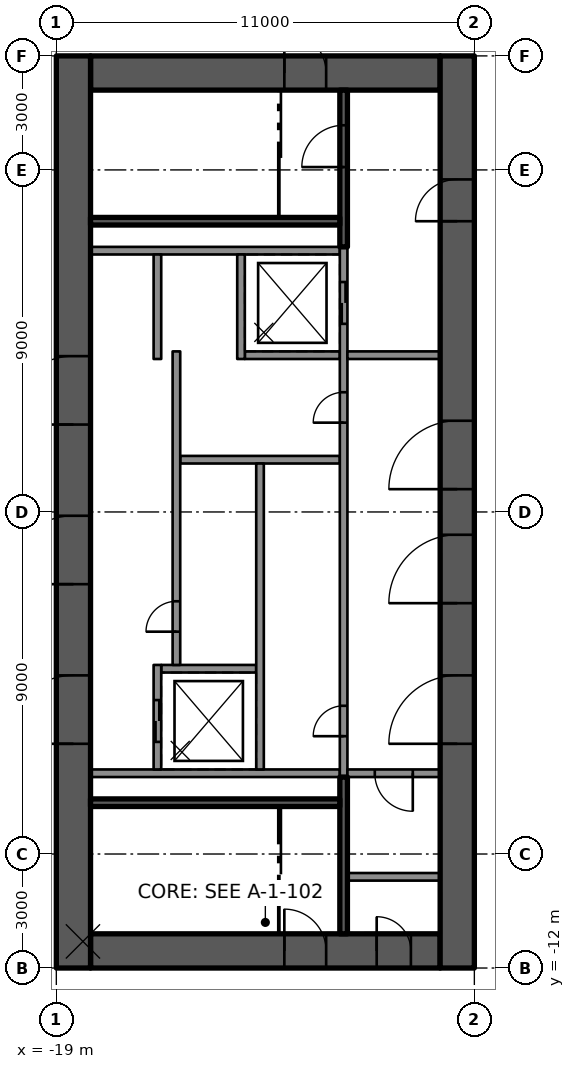
"""IFC4 building model, lengths in metres.
Left out: names, types, materials, properties, quantities, classifications, styles, units other than length and angle.
Written with IfcOpenShell. Run it as: python <this file> out.ifc"""

import sys

from ifc_helpers import new_model, si_unit, direction, frame, frame_2d, origin, place, context, subcontext, project, spatial, rectangle, extrude, element, fill, save


model = new_model("IFC4")
c1 = context("Model", 3, precision=1e-05, world=origin(), true_north=direction((0.0, 1.0)))
c2 = subcontext(c1, "Body", "Model", "MODEL_VIEW")
j1 = project(units=[si_unit("LENGTHUNIT", "METRE"), si_unit("PLANEANGLEUNIT", "RADIAN")], contexts=[c1])
p1 = place(None, origin())
s1 = spatial("IfcSite", under=j1, at=p1, CompositionType="ELEMENT")
p2 = place(p1, origin())
s2 = spatial("IfcBuilding", under=s1, at=p2, CompositionType="ELEMENT")
p3 = place(p2, frame((0.0, 0.0, 299.9)))
s3 = spatial("IfcBuildingStorey", under=s2, at=p3, CompositionType="ELEMENT", Elevation=299.9)
p4 = place(p3, frame((-18.1, 11.55, 0.0), z_axis=(0.0, 0.0, 1.0), x_axis=(1.0, 0.0, 0.0)))
e1 = element("IfcWall", 1, at=p4, inside=s3, PredefinedType="SHEAR", context=c2, shape_type="SweptSolid", body=[
    extrude(rectangle(XDim=9.2, YDim=0.9, at=frame_2d((4.6, 0.0))), origin(), (0.0, 0.0, 1.0), 4.4),
])
p5 = place(p4, frame((5.1, 0.0, 0.0)))
e2 = element("IfcOpeningElement", 2, at=p5, cuts=e1, PredefinedType="OPENING", context=c2, shape_type="SweptSolid", body=[
    extrude(rectangle(XDim=1.1, YDim=2.1, at=frame_2d((0.55, 1.05))), frame((0.0, 0.46, 0.0), z_axis=(0.0, -1.0, 0.0), x_axis=(1.0, 0.0, 0.0)), (0.0, 0.0, 1.0), 0.92),
])
p6 = place(p3, frame((-18.1, -11.55, 0.0), z_axis=(0.0, 0.0, 1.0), x_axis=(1.0, 0.0, 0.0)))
e3 = element("IfcWall", 3, at=p6, inside=s3, PredefinedType="SHEAR", context=c2, shape_type="SweptSolid", body=[
    extrude(rectangle(XDim=9.2, YDim=0.9, at=frame_2d((4.6, 0.0))), origin(), (0.0, 0.0, 1.0), 4.4),
])
p7 = place(p6, frame((5.1, 0.0, 0.0)))
e4 = element("IfcOpeningElement", 4, at=p7, cuts=e3, PredefinedType="OPENING", context=c2, shape_type="SweptSolid", body=[
    extrude(rectangle(XDim=1.1, YDim=2.1, at=frame_2d((0.55, 1.05))), frame((0.0, 0.46, 0.0), z_axis=(0.0, -1.0, 0.0), x_axis=(1.0, 0.0, 0.0)), (0.0, 0.0, 1.0), 0.92),
])
p8 = place(p6, frame((7.53, 0.0, 0.0)))
e5 = element("IfcOpeningElement", 5, at=p8, cuts=e3, PredefinedType="OPENING", context=c2, shape_type="SweptSolid", body=[
    extrude(rectangle(XDim=0.9, YDim=2.1, at=frame_2d((0.45, 1.05))), frame((0.0, 0.46, 0.0), z_axis=(0.0, -1.0, 0.0), x_axis=(1.0, 0.0, 0.0)), (0.0, 0.0, 1.0), 0.92),
])
p9 = place(p3, frame((-18.55, -12.0, 0.0), z_axis=(0.0, 0.0, 1.0), x_axis=(0.0, 1.0, 0.0)))
e6 = element("IfcWall", 6, at=p9, inside=s3, PredefinedType="SHEAR", context=c2, shape_type="SweptSolid", body=[
    extrude(rectangle(XDim=24.0, YDim=0.9, at=frame_2d((12.0, 0.0))), origin(), (0.0, 0.0, 1.0), 4.4),
])
p10 = place(p9, frame((5.9, 0.0, 0.0)))
e7 = element("IfcOpeningElement", 7, at=p10, cuts=e6, PredefinedType="OPENING", context=c2, shape_type="SweptSolid", body=[
    extrude(rectangle(XDim=1.8, YDim=2.1, at=frame_2d((0.9, 1.05))), frame((0.0, 0.46, 0.0), z_axis=(0.0, -1.0, 0.0), x_axis=(1.0, 0.0, 0.0)), (0.0, 0.0, 1.0), 0.92),
])
p11 = place(p9, frame((10.1, 0.0, 0.0)))
e8 = element("IfcOpeningElement", 8, at=p11, cuts=e6, PredefinedType="OPENING", context=c2, shape_type="SweptSolid", body=[
    extrude(rectangle(XDim=1.8, YDim=2.1, at=frame_2d((0.9, 1.05))), frame((0.0, 0.46, 0.0), z_axis=(0.0, -1.0, 0.0), x_axis=(1.0, 0.0, 0.0)), (0.0, 0.0, 1.0), 0.92),
])
p12 = place(p9, frame((14.3, 0.0, 0.0)))
e9 = element("IfcOpeningElement", 9, at=p12, cuts=e6, PredefinedType="OPENING", context=c2, shape_type="SweptSolid", body=[
    extrude(rectangle(XDim=1.8, YDim=2.1, at=frame_2d((0.9, 1.05))), frame((0.0, 0.46, 0.0), z_axis=(0.0, -1.0, 0.0), x_axis=(1.0, 0.0, 0.0)), (0.0, 0.0, 1.0), 0.92),
])
p13 = place(p3, frame((-8.45, -12.0, 0.0), z_axis=(0.0, 0.0, 1.0), x_axis=(0.0, 1.0, 0.0)))
e10 = element("IfcWall", 10, at=p13, inside=s3, PredefinedType="SHEAR", context=c2, shape_type="SweptSolid", body=[
    extrude(rectangle(XDim=24.0, YDim=0.9, at=frame_2d((12.0, 0.0))), origin(), (0.0, 0.0, 1.0), 4.4),
])
p14 = place(p13, frame((9.6, 0.0, 0.0)))
e11 = element("IfcOpeningElement", 11, at=p14, cuts=e10, PredefinedType="OPENING", context=c2, shape_type="SweptSolid", body=[
    extrude(rectangle(XDim=1.8, YDim=2.1, at=frame_2d((0.9, 1.05))), frame((0.0, 0.46, 0.0), z_axis=(0.0, -1.0, 0.0), x_axis=(1.0, 0.0, 0.0)), (0.0, 0.0, 1.0), 0.92),
])
p15 = place(p13, frame((5.9, 0.0, 0.0)))
e12 = element("IfcOpeningElement", 12, at=p15, cuts=e10, PredefinedType="OPENING", context=c2, shape_type="SweptSolid", body=[
    extrude(rectangle(XDim=1.8, YDim=2.1, at=frame_2d((0.9, 1.05))), frame((0.0, 0.46, 0.0), z_axis=(0.0, -1.0, 0.0), x_axis=(1.0, 0.0, 0.0)), (0.0, 0.0, 1.0), 0.92),
])
p16 = place(p13, frame((12.6, 0.0, 0.0)))
e13 = element("IfcOpeningElement", 13, at=p16, cuts=e10, PredefinedType="OPENING", context=c2, shape_type="SweptSolid", body=[
    extrude(rectangle(XDim=1.8, YDim=2.1, at=frame_2d((0.9, 1.05))), frame((0.0, 0.46, 0.0), z_axis=(0.0, -1.0, 0.0), x_axis=(1.0, 0.0, 0.0)), (0.0, 0.0, 1.0), 0.92),
])
p17 = place(p13, frame((19.65, 0.0, 0.0)))
e14 = element("IfcOpeningElement", 14, at=p17, cuts=e10, PredefinedType="OPENING", context=c2, shape_type="SweptSolid", body=[
    extrude(rectangle(XDim=1.1, YDim=2.1, at=frame_2d((0.55, 1.05))), frame((0.0, 0.46, 0.0), z_axis=(0.0, -1.0, 0.0), x_axis=(1.0, 0.0, 0.0)), (0.0, 0.0, 1.0), 0.92),
])
for number, where, z_axis, x_axis in (
    (15, (-11.54, 6.875, 0.0), (0.0, 0.0, 1.0), (-1.0, 0.0, 0.0)),
    (16, (-11.54, -6.875, 0.0), (0.0, 0.0, 1.0), (-1.0, 0.0, 0.0)),
):
    element("IfcWall", number, at=place(p3, frame(where, z_axis=z_axis, x_axis=x_axis)), inside=s3, PredefinedType="SOLIDWALL", context=c2, shape_type="SweptSolid", body=[
        extrude(rectangle(XDim=6.56, YDim=0.2, at=frame_2d((3.28, 0.0))), origin(), (0.0, 0.0, 1.0), 3.98),
    ])
p18 = place(p3, frame((-13.74, -4.125, 0.0), z_axis=(0.0, 0.0, 1.0), x_axis=(-1.0, 0.0, 0.0)))
e17 = element("IfcWall", 17, at=p18, inside=s3, PredefinedType="SOLIDWALL", context=c2, shape_type="SweptSolid", body=[
    extrude(rectangle(XDim=2.5, YDim=0.2, at=frame_2d((1.25, 0.0))), origin(), (0.0, 0.0, 1.0), 3.98),
])
p19 = place(p3, frame((-11.54, 1.375, 0.0), z_axis=(0.0, 0.0, 1.0), x_axis=(-1.0, 0.0, 0.0)))
e18 = element("IfcWall", 18, at=p19, inside=s3, PredefinedType="SOLIDWALL", context=c2, shape_type="SweptSolid", body=[
    extrude(rectangle(XDim=4.2, YDim=0.2, at=frame_2d((2.1, 0.0))), origin(), (0.0, 0.0, 1.0), 3.98),
])
p20 = place(p3, frame((-11.54, 4.125, 0.0), z_axis=(0.0, 0.0, 1.0), x_axis=(-1.0, 0.0, 0.0)))
e19 = element("IfcWall", 19, at=p20, inside=s3, PredefinedType="SOLIDWALL", context=c2, shape_type="SweptSolid", body=[
    extrude(rectangle(XDim=2.5, YDim=0.2, at=frame_2d((1.25, 0.0))), origin(), (0.0, 0.0, 1.0), 3.98),
])
p21 = place(p3, frame((-11.44, -6.975, 0.0), z_axis=(0.0, 0.0, 1.0), x_axis=(0.0, 1.0, 0.0)))
e20 = element("IfcWall", 20, at=p21, inside=s3, PredefinedType="SOLIDWALL", context=c2, shape_type="SweptSolid", body=[
    extrude(rectangle(XDim=13.95, YDim=0.2, at=frame_2d((6.975, 0.0))), origin(), (0.0, 0.0, 1.0), 3.98),
])
p22 = place(p21, frame((11.925, 0.0, 0.0)))
e21 = element("IfcOpeningElement", 21, at=p22, cuts=e20, PredefinedType="OPENING", context=c2, shape_type="SweptSolid", body=[
    extrude(rectangle(XDim=1.1, YDim=2.1, at=frame_2d((0.55, 1.05))), frame((0.0, 0.11, 0.0), z_axis=(0.0, -1.0, 0.0), x_axis=(1.0, 0.0, 0.0)), (0.0, 0.0, 1.0), 0.22),
])
p23 = place(p21, frame((1.075, 0.0, 0.0)))
e22 = element("IfcOpeningElement", 22, at=p23, cuts=e20, PredefinedType="OPENING", context=c2, shape_type="SweptSolid", body=[
    extrude(rectangle(XDim=0.8, YDim=2.1, at=frame_2d((0.4, 1.05))), frame((0.0, 0.11, 0.0), z_axis=(0.0, -1.0, 0.0), x_axis=(1.0, 0.0, 0.0)), (0.0, 0.0, 1.0), 0.22),
])
p24 = place(p21, frame((9.325, 0.0, 0.0)))
e23 = element("IfcOpeningElement", 23, at=p24, cuts=e20, PredefinedType="OPENING", context=c2, shape_type="SweptSolid", body=[
    extrude(rectangle(XDim=0.8, YDim=2.1, at=frame_2d((0.4, 1.05))), frame((0.0, 0.11, 0.0), z_axis=(0.0, -1.0, 0.0), x_axis=(1.0, 0.0, 0.0)), (0.0, 0.0, 1.0), 0.22),
])
p25 = place(p3, frame((-13.64, -6.775, 0.0), z_axis=(0.0, 0.0, 1.0), x_axis=(0.0, 1.0, 0.0)))
e24 = element("IfcWall", 24, at=p25, inside=s3, PredefinedType="SOLIDWALL", context=c2, shape_type="SweptSolid", body=[
    extrude(rectangle(XDim=8.05, YDim=0.2, at=frame_2d((4.025, 0.0))), origin(), (0.0, 0.0, 1.0), 3.98),
])
p26 = place(p3, frame((-14.14, 4.025, 0.0), z_axis=(0.0, 0.0, 1.0), x_axis=(0.0, 1.0, 0.0)))
e25 = element("IfcWall", 25, at=p26, inside=s3, PredefinedType="SOLIDWALL", context=c2, shape_type="SweptSolid", body=[
    extrude(rectangle(XDim=2.75, YDim=0.2, at=frame_2d((1.375, 0.0))), origin(), (0.0, 0.0, 1.0), 3.98),
])
p27 = place(p3, frame((-16.34, -6.775, 0.0), z_axis=(0.0, 0.0, 1.0), x_axis=(0.0, 1.0, 0.0)))
e26 = element("IfcWall", 26, at=p27, inside=s3, PredefinedType="SOLIDWALL", context=c2, shape_type="SweptSolid", body=[
    extrude(rectangle(XDim=2.75, YDim=0.2, at=frame_2d((1.375, 0.0))), origin(), (0.0, 0.0, 1.0), 3.98),
])
p28 = place(p27, frame((0.725, 0.0, 0.0)))
e27 = element("IfcOpeningElement", 27, at=p28, cuts=e26, PredefinedType="OPENING", context=c2, shape_type="SweptSolid", body=[
    extrude(rectangle(XDim=1.1, YDim=2.1, at=frame_2d((0.55, 1.05))), frame((0.0, 0.11, 0.0), z_axis=(0.0, -1.0, 0.0), x_axis=(1.0, 0.0, 0.0)), (0.0, 0.0, 1.0), 0.22),
])
p29 = place(p3, frame((-15.84, -4.025, 0.0), z_axis=(0.0, 0.0, 1.0), x_axis=(0.0, 1.0, 0.0)))
e28 = element("IfcWall", 28, at=p29, inside=s3, PredefinedType="SOLIDWALL", context=c2, shape_type="SweptSolid", body=[
    extrude(rectangle(XDim=8.25, YDim=0.2, at=frame_2d((4.125, 0.0))), origin(), (0.0, 0.0, 1.0), 3.98),
])
p30 = place(p29, frame((0.875, 0.0, 0.0)))
e29 = element("IfcOpeningElement", 29, at=p30, cuts=e28, PredefinedType="OPENING", context=c2, shape_type="SweptSolid", body=[
    extrude(rectangle(XDim=0.8, YDim=2.1, at=frame_2d((0.4, 1.05))), frame((0.0, 0.11, 0.0), z_axis=(0.0, -1.0, 0.0), x_axis=(1.0, 0.0, 0.0)), (0.0, 0.0, 1.0), 0.22),
])
p31 = place(p3, frame((-16.34, 4.025, 0.0), z_axis=(0.0, 0.0, 1.0), x_axis=(0.0, 1.0, 0.0)))
e30 = element("IfcWall", 30, at=p31, inside=s3, PredefinedType="SOLIDWALL", context=c2, shape_type="SweptSolid", body=[
    extrude(rectangle(XDim=2.75, YDim=0.2, at=frame_2d((1.375, 0.0))), origin(), (0.0, 0.0, 1.0), 3.98),
])
p32 = place(p3, frame((-11.44, 6.975, 0.0), z_axis=(0.0, 0.0, 1.0), x_axis=(0.0, 1.0, 0.0)))
e31 = element("IfcWall", 31, at=p32, inside=s3, PredefinedType="SOLIDWALL", context=c2, shape_type="SweptSolid", body=[
    extrude(rectangle(XDim=4.125, YDim=0.2, at=frame_2d((2.062, 0.0))), origin(), (0.0, 0.0, 1.0), 3.98),
])
p33 = place(p32, frame((2.1, 0.0, 0.0)))
e32 = element("IfcOpeningElement", 32, at=p33, cuts=e31, PredefinedType="OPENING", context=c2, shape_type="SweptSolid", body=[
    extrude(rectangle(XDim=1.1, YDim=2.1, at=frame_2d((0.55, 1.05))), frame((0.0, 0.11, 0.0), z_axis=(0.0, -1.0, 0.0), x_axis=(1.0, 0.0, 0.0)), (0.0, 0.0, 1.0), 0.22),
])
p34 = place(p3, frame((-11.54, 7.65, 0.0), z_axis=(0.0, 0.0, 1.0), x_axis=(-1.0, 0.0, 0.0)))
e33 = element("IfcWall", 33, at=p34, inside=s3, PredefinedType="SOLIDWALL", context=c2, shape_type="SweptSolid", body=[
    extrude(rectangle(XDim=6.56, YDim=0.2, at=frame_2d((3.28, 0.0))), origin(), (0.0, 0.0, 1.0), 3.98),
])
p35 = place(p3, frame((-11.44, -11.1, 0.0), z_axis=(0.0, 0.0, 1.0), x_axis=(0.0, 1.0, 0.0)))
e34 = element("IfcWall", 34, at=p35, inside=s3, PredefinedType="SOLIDWALL", context=c2, shape_type="SweptSolid", body=[
    extrude(rectangle(XDim=4.125, YDim=0.2, at=frame_2d((2.062, 0.0))), origin(), (0.0, 0.0, 1.0), 3.98),
])
p36 = place(p3, frame((-11.54, -7.65, 0.0), z_axis=(0.0, 0.0, 1.0), x_axis=(-1.0, 0.0, 0.0)))
e35 = element("IfcWall", 35, at=p36, inside=s3, PredefinedType="SOLIDWALL", context=c2, shape_type="SweptSolid", body=[
    extrude(rectangle(XDim=6.56, YDim=0.2, at=frame_2d((3.28, 0.0))), origin(), (0.0, 0.0, 1.0), 3.98),
])
p37 = place(p3, frame((-8.9, 4.125, 0.0), z_axis=(0.0, 0.0, 1.0), x_axis=(-1.0, 0.0, 0.0)))
e36 = element("IfcWall", 36, at=p37, inside=s3, PredefinedType="PARTITIONING", context=c2, shape_type="SweptSolid", body=[
    extrude(rectangle(XDim=2.44, YDim=0.2, at=frame_2d((1.22, 0.0))), origin(), (0.0, 0.0, 1.0), 3.98),
])
p38 = place(p3, frame((-8.9, -6.875, 0.0), z_axis=(0.0, 0.0, 1.0), x_axis=(-1.0, 0.0, 0.0)))
e37 = element("IfcWall", 37, at=p38, inside=s3, PredefinedType="PARTITIONING", context=c2, shape_type="SweptSolid", body=[
    extrude(rectangle(XDim=2.44, YDim=0.2, at=frame_2d((1.22, 0.0))), origin(), (0.0, 0.0, 1.0), 3.98),
])
p39 = place(p38, frame((0.72, 0.0, 0.0)))
e38 = element("IfcOpeningElement", 38, at=p39, cuts=e37, PredefinedType="OPENING", context=c2, shape_type="SweptSolid", body=[
    extrude(rectangle(XDim=1.0, YDim=2.1, at=frame_2d((0.5, 1.05))), frame((0.0, 0.11, 0.0), z_axis=(0.0, -1.0, 0.0), x_axis=(1.0, 0.0, 0.0)), (0.0, 0.0, 1.0), 0.22),
])
p40 = place(p3, frame((-8.9, -9.6, 0.0), z_axis=(0.0, 0.0, 1.0), x_axis=(-1.0, 0.0, 0.0)))
e39 = element("IfcWall", 39, at=p40, inside=s3, PredefinedType="PARTITIONING", context=c2, shape_type="SweptSolid", body=[
    extrude(rectangle(XDim=2.44, YDim=0.2, at=frame_2d((1.22, 0.0))), origin(), (0.0, 0.0, 1.0), 3.98),
])
p41 = place(p28, origin())
e40 = element("IfcDoor", 40, at=p41, inside=s3, OperationType="DOUBLE_DOOR_SLIDING", PredefinedType="DOOR", context=c2, shape_type="SweptSolid", body=[
    extrude(rectangle(XDim=1.1, YDim=2.1, at=frame_2d((0.55, 1.05))), frame((0.0, 0.025, 0.0), z_axis=(0.0, -1.0, 0.0), x_axis=(1.0, 0.0, 0.0)), (0.0, 0.0, 1.0), 0.05),
])
fill(e27, e40)
p42 = place(p22, origin())
e41 = element("IfcDoor", 41, at=p42, inside=s3, OperationType="DOUBLE_DOOR_SLIDING", PredefinedType="DOOR", context=c2, shape_type="SweptSolid", body=[
    extrude(rectangle(XDim=1.1, YDim=2.1, at=frame_2d((0.55, 1.05))), frame((0.0, 0.025, 0.0), z_axis=(0.0, -1.0, 0.0), x_axis=(1.0, 0.0, 0.0)), (0.0, 0.0, 1.0), 0.05),
])
fill(e21, e41)
p43 = place(p23, origin())
e42 = element("IfcDoor", 42, at=p43, inside=s3, OperationType="SINGLE_SWING_LEFT", PredefinedType="DOOR", context=c2, shape_type="SweptSolid", body=[
    extrude(rectangle(XDim=0.8, YDim=2.1, at=frame_2d((0.4, 1.05))), frame((0.0, 0.025, 0.0), z_axis=(0.0, -1.0, 0.0), x_axis=(1.0, 0.0, 0.0)), (0.0, 0.0, 1.0), 0.05),
])
fill(e22, e42)
p44 = place(p30, origin())
e43 = element("IfcDoor", 43, at=p44, inside=s3, OperationType="SINGLE_SWING_LEFT", PredefinedType="DOOR", context=c2, shape_type="SweptSolid", body=[
    extrude(rectangle(XDim=0.8, YDim=2.1, at=frame_2d((0.4, 1.05))), frame((0.0, 0.025, 0.0), z_axis=(0.0, -1.0, 0.0), x_axis=(1.0, 0.0, 0.0)), (0.0, 0.0, 1.0), 0.05),
])
fill(e29, e43)
p45 = place(p24, origin())
e44 = element("IfcDoor", 44, at=p45, inside=s3, OperationType="SINGLE_SWING_LEFT", PredefinedType="DOOR", context=c2, shape_type="SweptSolid", body=[
    extrude(rectangle(XDim=0.8, YDim=2.1, at=frame_2d((0.4, 1.05))), frame((0.0, 0.025, 0.0), z_axis=(0.0, -1.0, 0.0), x_axis=(1.0, 0.0, 0.0)), (0.0, 0.0, 1.0), 0.05),
])
fill(e23, e44)
p46 = place(p14, origin())
e45 = element("IfcDoor", 45, at=p46, inside=s3, OperationType="SINGLE_SWING_LEFT", PredefinedType="DOOR", context=c2, shape_type="SweptSolid", body=[
    extrude(rectangle(XDim=1.8, YDim=2.1, at=frame_2d((0.9, 1.05))), frame((0.0, 0.025, 0.0), z_axis=(0.0, -1.0, 0.0), x_axis=(1.0, 0.0, 0.0)), (0.0, 0.0, 1.0), 0.05),
])
fill(e11, e45)
p47 = place(p10, origin())
e46 = element("IfcDoor", 46, at=p47, inside=s3, OperationType="SINGLE_SWING_LEFT", PredefinedType="DOOR", context=c2, shape_type="SweptSolid", body=[
    extrude(rectangle(XDim=1.8, YDim=2.1, at=frame_2d((0.9, 1.05))), frame((0.0, 0.025, 0.0), z_axis=(0.0, -1.0, 0.0), x_axis=(1.0, 0.0, 0.0)), (0.0, 0.0, 1.0), 0.05),
])
fill(e7, e46)
p48 = place(p11, origin())
e47 = element("IfcDoor", 47, at=p48, inside=s3, OperationType="SINGLE_SWING_LEFT", PredefinedType="DOOR", context=c2, shape_type="SweptSolid", body=[
    extrude(rectangle(XDim=1.8, YDim=2.1, at=frame_2d((0.9, 1.05))), frame((0.0, 0.025, 0.0), z_axis=(0.0, -1.0, 0.0), x_axis=(1.0, 0.0, 0.0)), (0.0, 0.0, 1.0), 0.05),
])
fill(e8, e47)
p49 = place(p12, origin())
e48 = element("IfcDoor", 48, at=p49, inside=s3, OperationType="SINGLE_SWING_RIGHT", PredefinedType="DOOR", context=c2, shape_type="SweptSolid", body=[
    extrude(rectangle(XDim=1.8, YDim=2.1, at=frame_2d((0.9, 1.05))), frame((0.0, 0.025, 0.0), z_axis=(0.0, -1.0, 0.0), x_axis=(1.0, 0.0, 0.0)), (0.0, 0.0, 1.0), 0.05),
])
fill(e9, e48)
p50 = place(p15, origin())
e49 = element("IfcDoor", 49, at=p50, inside=s3, OperationType="SINGLE_SWING_LEFT", PredefinedType="DOOR", context=c2, shape_type="SweptSolid", body=[
    extrude(rectangle(XDim=1.8, YDim=2.1, at=frame_2d((0.9, 1.05))), frame((0.0, 0.025, 0.0), z_axis=(0.0, -1.0, 0.0), x_axis=(1.0, 0.0, 0.0)), (0.0, 0.0, 1.0), 0.05),
])
fill(e12, e49)
p51 = place(p16, origin())
e50 = element("IfcDoor", 50, at=p51, inside=s3, OperationType="SINGLE_SWING_RIGHT", PredefinedType="DOOR", context=c2, shape_type="SweptSolid", body=[
    extrude(rectangle(XDim=1.8, YDim=2.1, at=frame_2d((0.9, 1.05))), frame((0.0, 0.025, 0.0), z_axis=(0.0, -1.0, 0.0), x_axis=(1.0, 0.0, 0.0)), (0.0, 0.0, 1.0), 0.05),
])
fill(e13, e50)
p52 = place(p17, origin())
e51 = element("IfcDoor", 51, at=p52, inside=s3, OperationType="SINGLE_SWING_RIGHT", PredefinedType="DOOR", context=c2, shape_type="SweptSolid", body=[
    extrude(rectangle(XDim=1.1, YDim=2.1, at=frame_2d((0.55, 1.05))), frame((0.0, 0.025, 0.0), z_axis=(0.0, -1.0, 0.0), x_axis=(1.0, 0.0, 0.0)), (0.0, 0.0, 1.0), 0.05),
])
fill(e14, e51)
p53 = place(p5, origin())
e52 = element("IfcDoor", 52, at=p53, inside=s3, OperationType="SINGLE_SWING_RIGHT", PredefinedType="DOOR", context=c2, shape_type="SweptSolid", body=[
    extrude(rectangle(XDim=1.1, YDim=2.1, at=frame_2d((0.55, 1.05))), frame((0.0, 0.025, 0.0), z_axis=(0.0, -1.0, 0.0), x_axis=(1.0, 0.0, 0.0)), (0.0, 0.0, 1.0), 0.05),
])
fill(e2, e52)
p54 = place(p7, origin())
e53 = element("IfcDoor", 53, at=p54, inside=s3, OperationType="SINGLE_SWING_RIGHT", PredefinedType="DOOR", context=c2, shape_type="SweptSolid", body=[
    extrude(rectangle(XDim=1.1, YDim=2.1, at=frame_2d((0.55, 1.05))), frame((0.0, 0.025, 0.0), z_axis=(0.0, -1.0, 0.0), x_axis=(1.0, 0.0, 0.0)), (0.0, 0.0, 1.0), 0.05),
])
fill(e4, e53)
p55 = place(p33, origin())
e54 = element("IfcDoor", 54, at=p55, inside=s3, OperationType="SINGLE_SWING_RIGHT", PredefinedType="DOOR", context=c2, shape_type="SweptSolid", body=[
    extrude(rectangle(XDim=1.1, YDim=2.1, at=frame_2d((0.55, 1.05))), frame((0.0, 0.025, 0.0), z_axis=(0.0, -1.0, 0.0), x_axis=(1.0, 0.0, 0.0)), (0.0, 0.0, 1.0), 0.05),
])
fill(e32, e54)
p56 = place(p8, origin())
e55 = element("IfcDoor", 55, at=p56, inside=s3, OperationType="SINGLE_SWING_RIGHT", PredefinedType="DOOR", context=c2, shape_type="SweptSolid", body=[
    extrude(rectangle(XDim=0.9, YDim=2.1, at=frame_2d((0.45, 1.05))), frame((0.0, 0.025, 0.0), z_axis=(0.0, -1.0, 0.0), x_axis=(1.0, 0.0, 0.0)), (0.0, 0.0, 1.0), 0.05),
])
fill(e5, e55)
p57 = place(p39, origin())
e56 = element("IfcDoor", 56, at=p57, inside=s3, OperationType="SINGLE_SWING_RIGHT", PredefinedType="DOOR", context=c2, shape_type="SweptSolid", body=[
    extrude(rectangle(XDim=1.0, YDim=2.1, at=frame_2d((0.5, 1.05))), frame((0.0, 0.025, 0.0), z_axis=(0.0, -1.0, 0.0), x_axis=(1.0, 0.0, 0.0)), (0.0, 0.0, 1.0), 0.05),
])
fill(e38, e56)
save(model, sys.argv[1])
